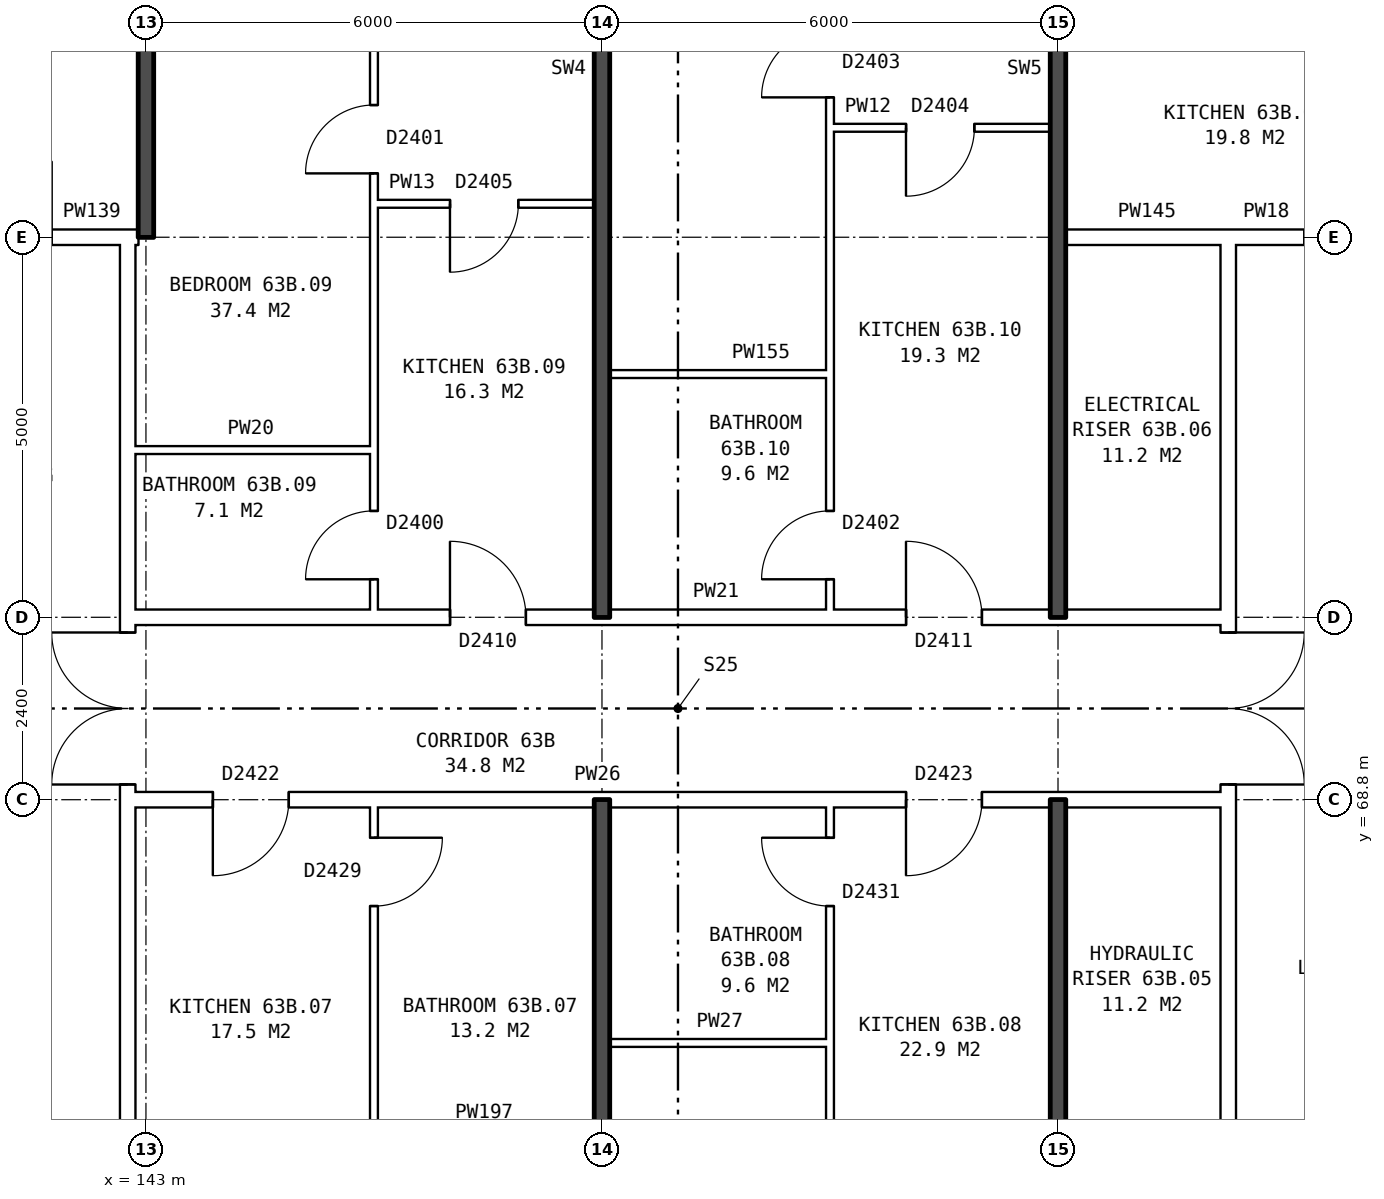
"""IFC4 building model, lengths in metres.
Left out: names, types, materials, properties, quantities, classifications, styles, units other than length and angle.
Written with IfcOpenShell. Run it as: python <this file> out.ifc"""

import sys

from ifc_helpers import new_model, si_unit, direction, frame, frame_2d, origin, place, context, subcontext, project, spatial, rectangle, extrude, element, fill, save


model = new_model("IFC4")
c1 = context("Model", 3, precision=1e-05, world=origin(), true_north=direction((0.0, 1.0)))
c2 = subcontext(c1, "Body", "Model", "MODEL_VIEW")
j1 = project(units=[si_unit("LENGTHUNIT", "METRE"), si_unit("PLANEANGLEUNIT", "RADIAN")], contexts=[c1])
p1 = place(None, origin())
s1 = spatial("IfcSite", under=j1, at=p1, CompositionType="ELEMENT")
p2 = place(p1, origin())
s2 = spatial("IfcBuilding", under=s1, at=p2, CompositionType="ELEMENT")
p3 = place(p2, frame((0.0, 0.0, 224.5)))
s3 = spatial("IfcBuildingStorey", under=s2, at=p3, CompositionType="ELEMENT", Elevation=224.5)
p4 = place(p3, frame((142.76, 63.9, 0.0), z_axis=(0.0, 0.0, 1.0), x_axis=(0.0, 1.0, 0.0)))
e1 = element("IfcWall", 1, at=p4, inside=s3, PredefinedType="PARTITIONING", context=c2, shape_type="SweptSolid", body=[
    extrude(rectangle(XDim=12.2, YDim=0.2, at=frame_2d((6.1, 0.0))), origin(), (0.0, 0.0, 1.0), 2.85),
])
p5 = place(p4, frame((5.1, 0.0, 0.0)))
e2 = element("IfcOpeningElement", 2, at=p5, cuts=e1, PredefinedType="OPENING", context=c2, shape_type="SweptSolid", body=[
    extrude(rectangle(XDim=2.0, YDim=2.1, at=frame_2d((1.0, 1.05))), frame((0.0, 0.11, 0.0), z_axis=(0.0, -1.0, 0.0), x_axis=(1.0, 0.0, 0.0)), (0.0, 0.0, 1.0), 0.22),
])
p6 = place(p3, frame((157.24, 63.9, 0.0), z_axis=(0.0, 0.0, 1.0), x_axis=(0.0, 1.0, 0.0)))
e3 = element("IfcWall", 3, at=p6, inside=s3, PredefinedType="PARTITIONING", context=c2, shape_type="SweptSolid", body=[
    extrude(rectangle(XDim=12.2, YDim=0.2, at=frame_2d((6.1, 0.0))), origin(), (0.0, 0.0, 1.0), 2.85),
])
p7 = place(p6, frame((5.1, 0.0, 0.0)))
e4 = element("IfcOpeningElement", 4, at=p7, cuts=e3, PredefinedType="OPENING", context=c2, shape_type="SweptSolid", body=[
    extrude(rectangle(XDim=2.0, YDim=2.1, at=frame_2d((1.0, 1.05))), frame((0.0, 0.11, 0.0), z_axis=(0.0, -1.0, 0.0), x_axis=(1.0, 0.0, 0.0)), (0.0, 0.0, 1.0), 0.22),
])
p8 = place(p3, frame((149.1, 65.6, 0.0), z_axis=(0.0, 0.0, 1.0), x_axis=(1.0, 0.0, 0.0)))
e5 = element("IfcWall", 5, at=p8, inside=s3, PredefinedType="PARTITIONING", context=c2, shape_type="SweptSolid", body=[
    extrude(rectangle(XDim=2.9, YDim=0.1, at=frame_2d((1.45, 0.0))), origin(), (0.0, 0.0, 1.0), 2.85),
])
p9 = place(p3, frame((142.76, 68.8, 0.0), z_axis=(0.0, 0.0, 1.0), x_axis=(1.0, 0.0, 0.0)))
e6 = element("IfcWall", 6, at=p9, inside=s3, PredefinedType="PARTITIONING", context=c2, shape_type="SweptSolid", body=[
    extrude(rectangle(XDim=14.48, YDim=0.2, at=frame_2d((7.24, 0.0))), origin(), (0.0, 0.0, 1.0), 2.85),
])
p10 = place(p9, frame((1.12, 0.0, 0.0)))
e7 = element("IfcOpeningElement", 7, at=p10, cuts=e6, PredefinedType="OPENING", context=c2, shape_type="SweptSolid", body=[
    extrude(rectangle(XDim=1.0, YDim=2.1, at=frame_2d((0.5, 1.05))), frame((0.0, 0.11, 0.0), z_axis=(0.0, -1.0, 0.0), x_axis=(1.0, 0.0, 0.0)), (0.0, 0.0, 1.0), 0.22),
])
p11 = place(p9, frame((10.24, 0.0, 0.0)))
e8 = element("IfcOpeningElement", 8, at=p11, cuts=e6, PredefinedType="OPENING", context=c2, shape_type="SweptSolid", body=[
    extrude(rectangle(XDim=1.0, YDim=2.1, at=frame_2d((0.5, 1.05))), frame((0.0, 0.11, 0.0), z_axis=(0.0, -1.0, 0.0), x_axis=(1.0, 0.0, 0.0)), (0.0, 0.0, 1.0), 0.22),
])
p12 = place(p3, frame((142.76, 71.2, 0.0), z_axis=(0.0, 0.0, 1.0), x_axis=(1.0, 0.0, 0.0)))
e9 = element("IfcWall", 9, at=p12, inside=s3, PredefinedType="PARTITIONING", context=c2, shape_type="SweptSolid", body=[
    extrude(rectangle(XDim=14.48, YDim=0.2, at=frame_2d((7.24, 0.0))), origin(), (0.0, 0.0, 1.0), 2.85),
])
p13 = place(p12, frame((4.24, 0.0, 0.0)))
e10 = element("IfcOpeningElement", 10, at=p13, cuts=e9, PredefinedType="OPENING", context=c2, shape_type="SweptSolid", body=[
    extrude(rectangle(XDim=1.0, YDim=2.1, at=frame_2d((0.5, 1.05))), frame((0.0, 0.11, 0.0), z_axis=(0.0, -1.0, 0.0), x_axis=(1.0, 0.0, 0.0)), (0.0, 0.0, 1.0), 0.22),
])
p14 = place(p12, frame((10.24, 0.0, 0.0)))
e11 = element("IfcOpeningElement", 11, at=p14, cuts=e9, PredefinedType="OPENING", context=c2, shape_type="SweptSolid", body=[
    extrude(rectangle(XDim=1.0, YDim=2.1, at=frame_2d((0.5, 1.05))), frame((0.0, 0.11, 0.0), z_axis=(0.0, -1.0, 0.0), x_axis=(1.0, 0.0, 0.0)), (0.0, 0.0, 1.0), 0.22),
])
p15 = place(p3, frame((142.76, 73.4, 0.0), z_axis=(0.0, 0.0, 1.0), x_axis=(1.0, 0.0, 0.0)))
e12 = element("IfcWall", 12, at=p15, inside=s3, PredefinedType="PARTITIONING", context=c2, shape_type="SweptSolid", body=[
    extrude(rectangle(XDim=3.24, YDim=0.1, at=frame_2d((1.62, 0.0))), origin(), (0.0, 0.0, 1.0), 2.85),
])
p16 = place(p3, frame((149.1, 74.4, 0.0), z_axis=(0.0, 0.0, 1.0), x_axis=(1.0, 0.0, 0.0)))
e13 = element("IfcWall", 13, at=p16, inside=s3, PredefinedType="PARTITIONING", context=c2, shape_type="SweptSolid", body=[
    extrude(rectangle(XDim=2.9, YDim=0.1, at=frame_2d((1.45, 0.0))), origin(), (0.0, 0.0, 1.0), 2.85),
])
p17 = place(p3, frame((139.76, 76.2, 0.0), z_axis=(0.0, 0.0, 1.0), x_axis=(1.0, 0.0, 0.0)))
e14 = element("IfcWall", 14, at=p17, inside=s3, PredefinedType="PARTITIONING", context=c2, shape_type="SweptSolid", body=[
    extrude(rectangle(XDim=3.0, YDim=0.2, at=frame_2d((1.5, 0.0))), origin(), (0.0, 0.0, 1.0), 2.85),
])
p18 = place(p17, frame((1.0, 0.0, 0.0)))
e15 = element("IfcOpeningElement", 15, at=p18, cuts=e14, PredefinedType="OPENING", context=c2, shape_type="SweptSolid", body=[
    extrude(rectangle(XDim=1.0, YDim=2.1, at=frame_2d((0.5, 1.05))), frame((0.0, 0.11, 0.0), z_axis=(0.0, -1.0, 0.0), x_axis=(1.0, 0.0, 0.0)), (0.0, 0.0, 1.0), 0.22),
])
p19 = place(p3, frame((142.76, 76.2, 0.0), z_axis=(0.0, 0.0, 1.0), x_axis=(1.0, 0.0, 0.0)))
e16 = element("IfcWall", 16, at=p19, inside=s3, PredefinedType="PARTITIONING", context=c2, shape_type="SweptSolid", body=[
    extrude(rectangle(XDim=0.14, YDim=0.2, at=frame_2d((0.07, 0.0))), origin(), (0.0, 0.0, 1.0), 2.85),
])
p20 = place(p3, frame((155.1, 76.2, 0.0), z_axis=(0.0, 0.0, 1.0), x_axis=(1.0, 0.0, 0.0)))
e17 = element("IfcWall", 17, at=p20, inside=s3, PredefinedType="PARTITIONING", context=c2, shape_type="SweptSolid", body=[
    extrude(rectangle(XDim=2.14, YDim=0.2, at=frame_2d((1.07, 0.0))), origin(), (0.0, 0.0, 1.0), 2.85),
])
p21 = place(p3, frame((157.24, 76.2, 0.0), z_axis=(0.0, 0.0, 1.0), x_axis=(1.0, 0.0, 0.0)))
e18 = element("IfcWall", 18, at=p21, inside=s3, PredefinedType="PARTITIONING", context=c2, shape_type="SweptSolid", body=[
    extrude(rectangle(XDim=3.0, YDim=0.2, at=frame_2d((1.5, 0.0))), origin(), (0.0, 0.0, 1.0), 2.85),
])
p22 = place(p21, frame((1.0, 0.0, 0.0)))
e19 = element("IfcOpeningElement", 19, at=p22, cuts=e18, PredefinedType="OPENING", context=c2, shape_type="SweptSolid", body=[
    extrude(rectangle(XDim=1.0, YDim=2.1, at=frame_2d((0.5, 1.05))), frame((0.0, 0.11, 0.0), z_axis=(0.0, -1.0, 0.0), x_axis=(1.0, 0.0, 0.0)), (0.0, 0.0, 1.0), 0.22),
])
p23 = place(p3, frame((146.0, 76.64, 0.0), z_axis=(0.0, 0.0, 1.0), x_axis=(1.0, 0.0, 0.0)))
e20 = element("IfcWall", 20, at=p23, inside=s3, PredefinedType="PARTITIONING", context=c2, shape_type="SweptSolid", body=[
    extrude(rectangle(XDim=2.9, YDim=0.1, at=frame_2d((1.45, 0.0))), origin(), (0.0, 0.0, 1.0), 2.85),
])
p24 = place(p23, frame((1.0, 0.0, 0.0)))
e21 = element("IfcOpeningElement", 21, at=p24, cuts=e20, PredefinedType="OPENING", context=c2, shape_type="SweptSolid", body=[
    extrude(rectangle(XDim=0.9, YDim=2.1, at=frame_2d((0.45, 1.05))), frame((0.0, 0.06, 0.0), z_axis=(0.0, -1.0, 0.0), x_axis=(1.0, 0.0, 0.0)), (0.0, 0.0, 1.0), 0.12),
])
p25 = place(p3, frame((152.0, 77.64, 0.0), z_axis=(0.0, 0.0, 1.0), x_axis=(1.0, 0.0, 0.0)))
e22 = element("IfcWall", 22, at=p25, inside=s3, PredefinedType="PARTITIONING", context=c2, shape_type="SweptSolid", body=[
    extrude(rectangle(XDim=2.9, YDim=0.1, at=frame_2d((1.45, 0.0))), origin(), (0.0, 0.0, 1.0), 2.85),
])
p26 = place(p25, frame((1.0, 0.0, 0.0)))
e23 = element("IfcOpeningElement", 23, at=p26, cuts=e22, PredefinedType="OPENING", context=c2, shape_type="SweptSolid", body=[
    extrude(rectangle(XDim=0.9, YDim=2.1, at=frame_2d((0.45, 1.05))), frame((0.0, 0.06, 0.0), z_axis=(0.0, -1.0, 0.0), x_axis=(1.0, 0.0, 0.0)), (0.0, 0.0, 1.0), 0.12),
])
p27 = place(p3, frame((143.0, 76.2, 0.0), z_axis=(0.0, 0.0, 1.0), x_axis=(0.0, 1.0, 0.0)))
e24 = element("IfcWall", 24, at=p27, inside=s3, PredefinedType="SOLIDWALL", context=c2, shape_type="SweptSolid", body=[
    extrude(rectangle(XDim=9.44, YDim=0.2, at=frame_2d((4.72, 0.0))), origin(), (0.0, 0.0, 1.0), 2.85),
])
p28 = place(p3, frame((146.0, 54.36, 0.0), z_axis=(0.0, 0.0, 1.0), x_axis=(0.0, 1.0, 0.0)))
e25 = element("IfcWall", 25, at=p28, inside=s3, PredefinedType="PARTITIONING", context=c2, shape_type="SweptSolid", body=[
    extrude(rectangle(XDim=14.34, YDim=0.1, at=frame_2d((7.17, 0.0))), origin(), (0.0, 0.0, 1.0), 2.85),
])
p29 = place(p28, frame((7.7, 0.0, 0.0)))
e26 = element("IfcOpeningElement", 26, at=p29, cuts=e25, PredefinedType="OPENING", context=c2, shape_type="SweptSolid", body=[
    extrude(rectangle(XDim=0.9, YDim=2.1, at=frame_2d((0.45, 1.05))), frame((0.0, 0.06, 0.0), z_axis=(0.0, -1.0, 0.0), x_axis=(1.0, 0.0, 0.0)), (0.0, 0.0, 1.0), 0.12),
])
p30 = place(p28, frame((13.04, 0.0, 0.0)))
e27 = element("IfcOpeningElement", 27, at=p30, cuts=e25, PredefinedType="OPENING", context=c2, shape_type="SweptSolid", body=[
    extrude(rectangle(XDim=0.9, YDim=2.1, at=frame_2d((0.45, 1.05))), frame((0.0, 0.06, 0.0), z_axis=(0.0, -1.0, 0.0), x_axis=(1.0, 0.0, 0.0)), (0.0, 0.0, 1.0), 0.12),
])
p31 = place(p3, frame((146.0, 71.3, 0.0), z_axis=(0.0, 0.0, 1.0), x_axis=(0.0, 1.0, 0.0)))
e28 = element("IfcWall", 28, at=p31, inside=s3, PredefinedType="PARTITIONING", context=c2, shape_type="SweptSolid", body=[
    extrude(rectangle(XDim=14.34, YDim=0.1, at=frame_2d((7.17, 0.0))), origin(), (0.0, 0.0, 1.0), 2.85),
])
p32 = place(p31, frame((5.74, 0.0, 0.0)))
e29 = element("IfcOpeningElement", 29, at=p32, cuts=e28, PredefinedType="OPENING", context=c2, shape_type="SweptSolid", body=[
    extrude(rectangle(XDim=0.9, YDim=2.1, at=frame_2d((0.45, 1.05))), frame((0.0, 0.06, 0.0), z_axis=(0.0, -1.0, 0.0), x_axis=(1.0, 0.0, 0.0)), (0.0, 0.0, 1.0), 0.12),
])
p33 = place(p31, frame((0.4, 0.0, 0.0)))
e30 = element("IfcOpeningElement", 30, at=p33, cuts=e28, PredefinedType="OPENING", context=c2, shape_type="SweptSolid", body=[
    extrude(rectangle(XDim=0.9, YDim=2.1, at=frame_2d((0.45, 1.05))), frame((0.0, 0.06, 0.0), z_axis=(0.0, -1.0, 0.0), x_axis=(1.0, 0.0, 0.0)), (0.0, 0.0, 1.0), 0.12),
])
for number, where, z_axis, x_axis in (
    (31, (149.0, 54.36, 0.0), (0.0, 0.0, 1.0), (0.0, 1.0, 0.0)),
    (32, (149.0, 71.2, 0.0), (0.0, 0.0, 1.0), (0.0, 1.0, 0.0)),
):
    element("IfcWall", number, at=place(p3, frame(where, z_axis=z_axis, x_axis=x_axis)), inside=s3, PredefinedType="SOLIDWALL", context=c2, shape_type="SweptSolid", body=[
        extrude(rectangle(XDim=14.44, YDim=0.2, at=frame_2d((7.22, 0.0))), origin(), (0.0, 0.0, 1.0), 2.85),
    ])
p34 = place(p3, frame((152.0, 54.36, 0.0), z_axis=(0.0, 0.0, 1.0), x_axis=(0.0, 1.0, 0.0)))
e33 = element("IfcWall", 33, at=p34, inside=s3, PredefinedType="PARTITIONING", context=c2, shape_type="SweptSolid", body=[
    extrude(rectangle(XDim=14.34, YDim=0.1, at=frame_2d((7.17, 0.0))), origin(), (0.0, 0.0, 1.0), 2.85),
])
p35 = place(p34, frame((5.5, 0.0, 0.0)))
e34 = element("IfcOpeningElement", 34, at=p35, cuts=e33, PredefinedType="OPENING", context=c2, shape_type="SweptSolid", body=[
    extrude(rectangle(XDim=0.9, YDim=2.1, at=frame_2d((0.45, 1.05))), frame((0.0, 0.06, 0.0), z_axis=(0.0, -1.0, 0.0), x_axis=(1.0, 0.0, 0.0)), (0.0, 0.0, 1.0), 0.12),
])
p36 = place(p34, frame((13.04, 0.0, 0.0)))
e35 = element("IfcOpeningElement", 35, at=p36, cuts=e33, PredefinedType="OPENING", context=c2, shape_type="SweptSolid", body=[
    extrude(rectangle(XDim=0.9, YDim=2.1, at=frame_2d((0.45, 1.05))), frame((0.0, 0.06, 0.0), z_axis=(0.0, -1.0, 0.0), x_axis=(1.0, 0.0, 0.0)), (0.0, 0.0, 1.0), 0.12),
])
p37 = place(p3, frame((152.0, 71.3, 0.0), z_axis=(0.0, 0.0, 1.0), x_axis=(0.0, 1.0, 0.0)))
e36 = element("IfcWall", 36, at=p37, inside=s3, PredefinedType="PARTITIONING", context=c2, shape_type="SweptSolid", body=[
    extrude(rectangle(XDim=14.34, YDim=0.1, at=frame_2d((7.17, 0.0))), origin(), (0.0, 0.0, 1.0), 2.85),
])
p38 = place(p37, frame((6.74, 0.0, 0.0)))
e37 = element("IfcOpeningElement", 37, at=p38, cuts=e36, PredefinedType="OPENING", context=c2, shape_type="SweptSolid", body=[
    extrude(rectangle(XDim=0.9, YDim=2.1, at=frame_2d((0.45, 1.05))), frame((0.0, 0.06, 0.0), z_axis=(0.0, -1.0, 0.0), x_axis=(1.0, 0.0, 0.0)), (0.0, 0.0, 1.0), 0.12),
])
p39 = place(p37, frame((0.4, 0.0, 0.0)))
e38 = element("IfcOpeningElement", 38, at=p39, cuts=e36, PredefinedType="OPENING", context=c2, shape_type="SweptSolid", body=[
    extrude(rectangle(XDim=0.9, YDim=2.1, at=frame_2d((0.45, 1.05))), frame((0.0, 0.06, 0.0), z_axis=(0.0, -1.0, 0.0), x_axis=(1.0, 0.0, 0.0)), (0.0, 0.0, 1.0), 0.12),
])
for number, where, z_axis, x_axis in (
    (39, (155.0, 54.36, 0.0), (0.0, 0.0, 1.0), (0.0, 1.0, 0.0)),
    (40, (155.0, 71.2, 0.0), (0.0, 0.0, 1.0), (0.0, 1.0, 0.0)),
):
    element("IfcWall", number, at=place(p3, frame(where, z_axis=z_axis, x_axis=x_axis)), inside=s3, PredefinedType="SOLIDWALL", context=c2, shape_type="SweptSolid", body=[
        extrude(rectangle(XDim=14.44, YDim=0.2, at=frame_2d((7.22, 0.0))), origin(), (0.0, 0.0, 1.0), 2.85),
    ])
p40 = place(p5, origin())
e41 = element("IfcDoor", 41, at=p40, inside=s3, OperationType="DOUBLE_DOOR_SINGLE_SWING", PredefinedType="DOOR", context=c2, shape_type="SweptSolid", body=[
    extrude(rectangle(XDim=2.0, YDim=2.1, at=frame_2d((1.0, 1.05))), frame((0.0, 0.025, 0.0), z_axis=(0.0, -1.0, 0.0), x_axis=(1.0, 0.0, 0.0)), (0.0, 0.0, 1.0), 0.05),
])
fill(e2, e41)
p41 = place(p7, frame((2.0, 0.0, 0.0), z_axis=(0.0, 0.0, 1.0), x_axis=(-1.0, 0.0, 0.0)))
e42 = element("IfcDoor", 42, at=p41, inside=s3, OperationType="DOUBLE_DOOR_SINGLE_SWING", PredefinedType="DOOR", context=c2, shape_type="SweptSolid", body=[
    extrude(rectangle(XDim=2.0, YDim=2.1, at=frame_2d((1.0, 1.05))), frame((0.0, 0.025, 0.0), z_axis=(0.0, -1.0, 0.0), x_axis=(1.0, 0.0, 0.0)), (0.0, 0.0, 1.0), 0.05),
])
fill(e4, e42)
p42 = place(p10, frame((1.0, 0.0, 0.0), z_axis=(0.0, 0.0, 1.0), x_axis=(-1.0, 0.0, 0.0)))
e43 = element("IfcDoor", 43, at=p42, inside=s3, OperationType="SINGLE_SWING_RIGHT", PredefinedType="DOOR", context=c2, shape_type="SweptSolid", body=[
    extrude(rectangle(XDim=1.0, YDim=2.1, at=frame_2d((0.5, 1.05))), frame((0.0, 0.025, 0.0), z_axis=(0.0, -1.0, 0.0), x_axis=(1.0, 0.0, 0.0)), (0.0, 0.0, 1.0), 0.05),
])
fill(e7, e43)
p43 = place(p30, frame((0.9, 0.0, 0.0), z_axis=(0.0, 0.0, 1.0), x_axis=(-1.0, 0.0, 0.0)))
e44 = element("IfcDoor", 44, at=p43, inside=s3, OperationType="SINGLE_SWING_LEFT", PredefinedType="DOOR", context=c2, shape_type="SweptSolid", body=[
    extrude(rectangle(XDim=0.9, YDim=2.1, at=frame_2d((0.45, 1.05))), frame((0.0, 0.025, 0.0), z_axis=(0.0, -1.0, 0.0), x_axis=(1.0, 0.0, 0.0)), (0.0, 0.0, 1.0), 0.05),
])
fill(e27, e44)
p44 = place(p11, frame((1.0, 0.0, 0.0), z_axis=(0.0, 0.0, 1.0), x_axis=(-1.0, 0.0, 0.0)))
e45 = element("IfcDoor", 45, at=p44, inside=s3, OperationType="SINGLE_SWING_RIGHT", PredefinedType="DOOR", context=c2, shape_type="SweptSolid", body=[
    extrude(rectangle(XDim=1.0, YDim=2.1, at=frame_2d((0.5, 1.05))), frame((0.0, 0.025, 0.0), z_axis=(0.0, -1.0, 0.0), x_axis=(1.0, 0.0, 0.0)), (0.0, 0.0, 1.0), 0.05),
])
fill(e8, e45)
p45 = place(p36, origin())
e46 = element("IfcDoor", 46, at=p45, inside=s3, OperationType="SINGLE_SWING_RIGHT", PredefinedType="DOOR", context=c2, shape_type="SweptSolid", body=[
    extrude(rectangle(XDim=0.9, YDim=2.1, at=frame_2d((0.45, 1.05))), frame((0.0, 0.025, 0.0), z_axis=(0.0, -1.0, 0.0), x_axis=(1.0, 0.0, 0.0)), (0.0, 0.0, 1.0), 0.05),
])
fill(e35, e46)
p46 = place(p32, origin())
e47 = element("IfcDoor", 47, at=p46, inside=s3, OperationType="SINGLE_SWING_LEFT", PredefinedType="DOOR", context=c2, shape_type="SweptSolid", body=[
    extrude(rectangle(XDim=0.9, YDim=2.1, at=frame_2d((0.45, 1.05))), frame((0.0, 0.025, 0.0), z_axis=(0.0, -1.0, 0.0), x_axis=(1.0, 0.0, 0.0)), (0.0, 0.0, 1.0), 0.05),
])
fill(e29, e47)
p47 = place(p13, origin())
e48 = element("IfcDoor", 48, at=p47, inside=s3, OperationType="SINGLE_SWING_LEFT", PredefinedType="DOOR", context=c2, shape_type="SweptSolid", body=[
    extrude(rectangle(XDim=1.0, YDim=2.1, at=frame_2d((0.5, 1.05))), frame((0.0, 0.025, 0.0), z_axis=(0.0, -1.0, 0.0), x_axis=(1.0, 0.0, 0.0)), (0.0, 0.0, 1.0), 0.05),
])
fill(e10, e48)
p48 = place(p24, frame((0.9, 0.0, 0.0), z_axis=(0.0, 0.0, 1.0), x_axis=(-1.0, 0.0, 0.0)))
e49 = element("IfcDoor", 49, at=p48, inside=s3, OperationType="SINGLE_SWING_RIGHT", PredefinedType="DOOR", context=c2, shape_type="SweptSolid", body=[
    extrude(rectangle(XDim=0.9, YDim=2.1, at=frame_2d((0.45, 1.05))), frame((0.0, 0.025, 0.0), z_axis=(0.0, -1.0, 0.0), x_axis=(1.0, 0.0, 0.0)), (0.0, 0.0, 1.0), 0.05),
])
fill(e21, e49)
p49 = place(p33, origin())
e50 = element("IfcDoor", 50, at=p49, inside=s3, OperationType="SINGLE_SWING_LEFT", PredefinedType="DOOR", context=c2, shape_type="SweptSolid", body=[
    extrude(rectangle(XDim=0.9, YDim=2.1, at=frame_2d((0.45, 1.05))), frame((0.0, 0.025, 0.0), z_axis=(0.0, -1.0, 0.0), x_axis=(1.0, 0.0, 0.0)), (0.0, 0.0, 1.0), 0.05),
])
fill(e30, e50)
p50 = place(p38, origin())
e51 = element("IfcDoor", 51, at=p50, inside=s3, OperationType="SINGLE_SWING_LEFT", PredefinedType="DOOR", context=c2, shape_type="SweptSolid", body=[
    extrude(rectangle(XDim=0.9, YDim=2.1, at=frame_2d((0.45, 1.05))), frame((0.0, 0.025, 0.0), z_axis=(0.0, -1.0, 0.0), x_axis=(1.0, 0.0, 0.0)), (0.0, 0.0, 1.0), 0.05),
])
fill(e37, e51)
p51 = place(p14, origin())
e52 = element("IfcDoor", 52, at=p51, inside=s3, OperationType="SINGLE_SWING_LEFT", PredefinedType="DOOR", context=c2, shape_type="SweptSolid", body=[
    extrude(rectangle(XDim=1.0, YDim=2.1, at=frame_2d((0.5, 1.05))), frame((0.0, 0.025, 0.0), z_axis=(0.0, -1.0, 0.0), x_axis=(1.0, 0.0, 0.0)), (0.0, 0.0, 1.0), 0.05),
])
fill(e11, e52)
p52 = place(p26, frame((0.9, 0.0, 0.0), z_axis=(0.0, 0.0, 1.0), x_axis=(-1.0, 0.0, 0.0)))
e53 = element("IfcDoor", 53, at=p52, inside=s3, OperationType="SINGLE_SWING_RIGHT", PredefinedType="DOOR", context=c2, shape_type="SweptSolid", body=[
    extrude(rectangle(XDim=0.9, YDim=2.1, at=frame_2d((0.45, 1.05))), frame((0.0, 0.025, 0.0), z_axis=(0.0, -1.0, 0.0), x_axis=(1.0, 0.0, 0.0)), (0.0, 0.0, 1.0), 0.05),
])
fill(e23, e53)
p53 = place(p39, origin())
e54 = element("IfcDoor", 54, at=p53, inside=s3, OperationType="SINGLE_SWING_LEFT", PredefinedType="DOOR", context=c2, shape_type="SweptSolid", body=[
    extrude(rectangle(XDim=0.9, YDim=2.1, at=frame_2d((0.45, 1.05))), frame((0.0, 0.025, 0.0), z_axis=(0.0, -1.0, 0.0), x_axis=(1.0, 0.0, 0.0)), (0.0, 0.0, 1.0), 0.05),
])
fill(e38, e54)
save(model, sys.argv[1])
